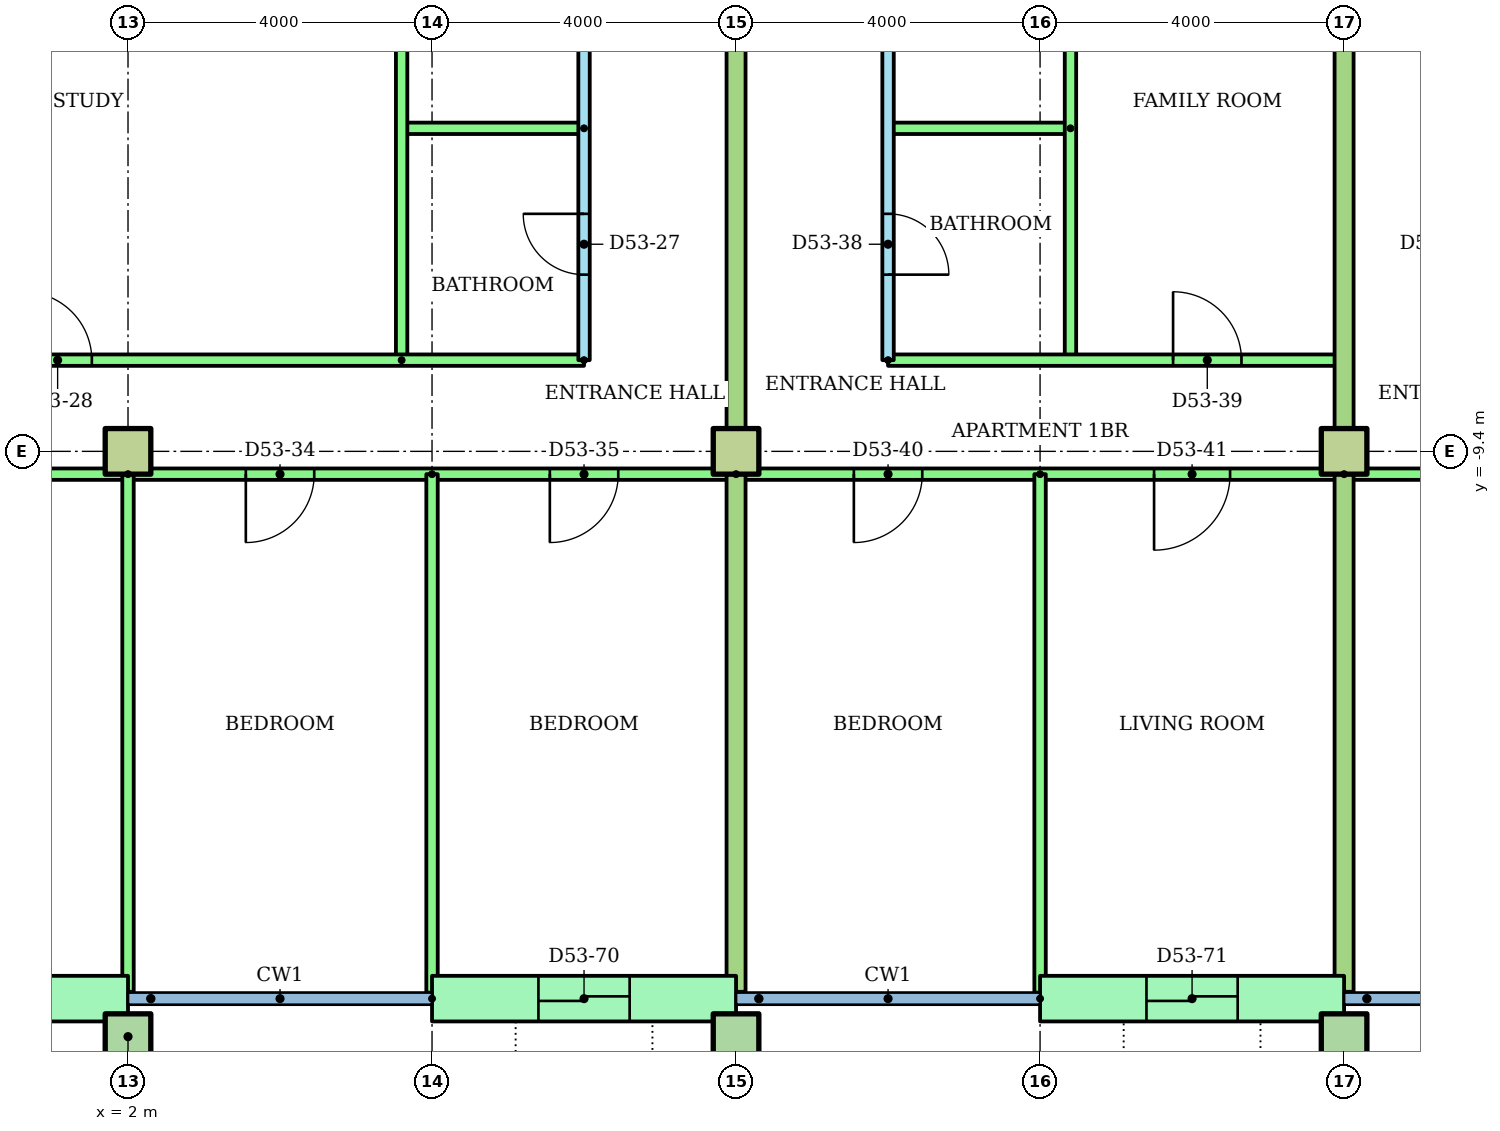
"""IFC4 building model, lengths in metres.
Left out: names, types, materials, properties, quantities, classifications, styles, units other than length and angle.
Written with IfcOpenShell. Run it as: python <this file> out.ifc"""

import sys

from ifc_helpers import new_model, si_unit, direction, frame, frame_2d, origin, origin_2d, place, context, subcontext, project, spatial, rectangle, hollow_rectangle, extrude, element, fill, save


model = new_model("IFC4")
c1 = context("Model", 3, precision=1e-05, world=origin(), true_north=direction((0.0, 1.0)))
c2 = subcontext(c1, "Body", "Model", "MODEL_VIEW")
j1 = project(units=[si_unit("LENGTHUNIT", "METRE"), si_unit("PLANEANGLEUNIT", "RADIAN")], contexts=[c1])
p1 = place(None, origin())
s1 = spatial("IfcSite", under=j1, at=p1, CompositionType="ELEMENT")
p2 = place(p1, origin())
s2 = spatial("IfcBuilding", under=s1, at=p2, CompositionType="ELEMENT")
p3 = place(p2, frame((0.0, 0.0, 207.6)))
s3 = spatial("IfcBuildingStorey", under=s2, at=p3, CompositionType="ELEMENT", Elevation=207.6)
for number, where in (
    (1, (2.0, -17.1, 0.0)),
    (2, (10.0, -17.1, 0.0)),
    (3, (18.0, -17.1, 0.0)),
):
    element("IfcColumn", number, at=place(p3, frame(where)), inside=s3, PredefinedType="COLUMN", context=c2, shape_type="SweptSolid", body=[
        extrude(hollow_rectangle(XDim=0.6, YDim=0.6, WallThickness=0.03, at=origin_2d()), origin(), (0.0, 0.0, 1.0), 3.2),
    ])
for number, where in (
    (4, (2.0, -9.4, 0.0)),
    (5, (10.0, -9.4, 0.0)),
    (6, (18.0, -9.4, 0.0)),
):
    element("IfcColumn", number, at=place(p3, frame(where)), inside=s3, PredefinedType="COLUMN", context=c2, shape_type="SweptSolid", body=[
        extrude(rectangle(XDim=0.6, YDim=0.6, at=origin_2d()), origin(), (0.0, 0.0, 1.0), 3.2),
    ])
p4 = place(p3, frame((-2.0, -16.6, 0.0)))
e7 = element("IfcWall", 7, at=p4, inside=s3, PredefinedType="STANDARD", context=c2, shape_type="SweptSolid", body=[
    extrude(rectangle(XDim=4.0, YDim=0.6, at=frame_2d((2.0, 0.0))), origin(), (0.0, 0.0, 1.0), 2.92),
])
p5 = place(p4, frame((1.4, 0.0, 0.0)))
e8 = element("IfcOpeningElement", 8, at=p5, cuts=e7, PredefinedType="OPENING", context=c2, shape_type="SweptSolid", body=[
    extrude(rectangle(XDim=1.2, YDim=2.1, at=frame_2d((0.6, 1.05))), frame((0.0, 0.31, 0.0), z_axis=(0.0, -1.0, 0.0), x_axis=(1.0, 0.0, 0.0)), (0.0, 0.0, 1.0), 0.62),
])
p6 = place(p3, frame((6.0, -16.6, 0.0)))
e9 = element("IfcWall", 9, at=p6, inside=s3, PredefinedType="STANDARD", context=c2, shape_type="SweptSolid", body=[
    extrude(rectangle(XDim=4.0, YDim=0.6, at=frame_2d((2.0, 0.0))), origin(), (0.0, 0.0, 1.0), 2.92),
])
p7 = place(p6, frame((1.4, 0.0, 0.0)))
e10 = element("IfcOpeningElement", 10, at=p7, cuts=e9, PredefinedType="OPENING", context=c2, shape_type="SweptSolid", body=[
    extrude(rectangle(XDim=1.2, YDim=2.1, at=frame_2d((0.6, 1.05))), frame((0.0, 0.31, 0.0), z_axis=(0.0, -1.0, 0.0), x_axis=(1.0, 0.0, 0.0)), (0.0, 0.0, 1.0), 0.62),
])
p8 = place(p3, frame((14.0, -16.6, 0.0)))
e11 = element("IfcWall", 11, at=p8, inside=s3, PredefinedType="STANDARD", context=c2, shape_type="SweptSolid", body=[
    extrude(rectangle(XDim=4.0, YDim=0.6, at=frame_2d((2.0, 0.0))), origin(), (0.0, 0.0, 1.0), 2.92),
])
p9 = place(p8, frame((1.4, 0.0, 0.0)))
e12 = element("IfcOpeningElement", 12, at=p9, cuts=e11, PredefinedType="OPENING", context=c2, shape_type="SweptSolid", body=[
    extrude(rectangle(XDim=1.2, YDim=2.1, at=frame_2d((0.6, 1.05))), frame((0.0, 0.31, 0.0), z_axis=(0.0, -1.0, 0.0), x_axis=(1.0, 0.0, 0.0)), (0.0, 0.0, 1.0), 0.62),
])
p10 = place(p3, frame((8.0, -8.2, 0.0), z_axis=(0.0, 0.0, 1.0), x_axis=(0.0, 1.0, 0.0)))
e13 = element("IfcWall", 13, at=p10, inside=s3, PredefinedType="PARTITIONING", context=c2, shape_type="SweptSolid", body=[
    extrude(rectangle(XDim=6.8, YDim=0.15, at=frame_2d((3.4, 0.0))), origin(), (0.0, 0.0, 1.0), 2.4),
])
p11 = place(p10, frame((4.475, 0.0, 0.0)))
e14 = element("IfcOpeningElement", 14, at=p11, cuts=e13, PredefinedType="OPENING", context=c2, shape_type="SweptSolid", body=[
    extrude(rectangle(XDim=0.9, YDim=2.1, at=frame_2d((0.45, 1.05))), frame((0.0, 0.085, 0.0), z_axis=(0.0, -1.0, 0.0), x_axis=(1.0, 0.0, 0.0)), (0.0, 0.0, 1.0), 0.17),
])
p12 = place(p10, frame((1.125, 0.0, 0.0)))
e15 = element("IfcOpeningElement", 15, at=p12, cuts=e13, PredefinedType="OPENING", context=c2, shape_type="SweptSolid", body=[
    extrude(rectangle(XDim=0.8, YDim=2.1, at=frame_2d((0.4, 1.05))), frame((0.0, 0.085, 0.0), z_axis=(0.0, -1.0, 0.0), x_axis=(1.0, 0.0, 0.0)), (0.0, 0.0, 1.0), 0.17),
])
p13 = place(p3, frame((8.0, -5.15, 0.0), z_axis=(0.0, 0.0, 1.0), x_axis=(-1.0, 0.0, 0.0)))
e16 = element("IfcWall", 16, at=p13, inside=s3, PredefinedType="PARTITIONING", context=c2, shape_type="SweptSolid", body=[
    extrude(rectangle(XDim=2.4, YDim=0.15, at=frame_2d((1.2, 0.0))), origin(), (0.0, 0.0, 1.0), 2.4),
])
p14 = place(p3, frame((5.6, -8.2, 0.0), z_axis=(0.0, 0.0, 1.0), x_axis=(0.0, 1.0, 0.0)))
e17 = element("IfcWall", 17, at=p14, inside=s3, PredefinedType="PARTITIONING", context=c2, shape_type="SweptSolid", body=[
    extrude(rectangle(XDim=6.8, YDim=0.15, at=frame_2d((3.4, 0.0))), origin(), (0.0, 0.0, 1.0), 2.4),
])
p15 = place(p3, frame((-14.0, -8.2, 0.0)))
e18 = element("IfcWall", 18, at=p15, inside=s3, PredefinedType="PARTITIONING", context=c2, shape_type="SweptSolid", body=[
    extrude(rectangle(XDim=22.0, YDim=0.15, at=frame_2d((11.0, 0.0))), origin(), (0.0, 0.0, 1.0), 2.4),
])
p16 = place(p15, frame((14.624, 0.0, 0.0)))
e19 = element("IfcOpeningElement", 19, at=p16, cuts=e18, PredefinedType="OPENING", context=c2, shape_type="SweptSolid", body=[
    extrude(rectangle(XDim=0.9, YDim=2.1, at=frame_2d((0.45, 1.05))), frame((0.0, 0.085, 0.0), z_axis=(0.0, -1.0, 0.0), x_axis=(1.0, 0.0, 0.0)), (0.0, 0.0, 1.0), 0.17),
])
p17 = place(p15, frame((8.476, 0.0, 0.0)))
e20 = element("IfcOpeningElement", 20, at=p17, cuts=e18, PredefinedType="OPENING", context=c2, shape_type="SweptSolid", body=[
    extrude(rectangle(XDim=0.9, YDim=2.1, at=frame_2d((0.45, 1.05))), frame((0.0, 0.085, 0.0), z_axis=(0.0, -1.0, 0.0), x_axis=(1.0, 0.0, 0.0)), (0.0, 0.0, 1.0), 0.17),
])
p18 = place(p15, frame((1.975, 0.0, 0.0)))
e21 = element("IfcOpeningElement", 21, at=p18, cuts=e18, PredefinedType="OPENING", context=c2, shape_type="SweptSolid", body=[
    extrude(rectangle(XDim=0.9, YDim=2.1, at=frame_2d((0.45, 1.05))), frame((0.0, 0.085, 0.0), z_axis=(0.0, -1.0, 0.0), x_axis=(1.0, 0.0, 0.0)), (0.0, 0.0, 1.0), 0.17),
])
p19 = place(p3, frame((10.0, -9.7, 0.0), z_axis=(0.0, 0.0, 1.0), x_axis=(-1.0, 0.0, 0.0)))
e22 = element("IfcWall", 22, at=p19, inside=s3, PredefinedType="PARTITIONING", context=c2, shape_type="SweptSolid", body=[
    extrude(rectangle(XDim=24.0, YDim=0.15, at=frame_2d((12.0, 0.0))), origin(), (0.0, 0.0, 1.0), 2.4),
])
p20 = place(p19, frame((21.55, 0.0, 0.0)))
e23 = element("IfcOpeningElement", 23, at=p20, cuts=e22, PredefinedType="OPENING", context=c2, shape_type="SweptSolid", body=[
    extrude(rectangle(XDim=0.9, YDim=2.1, at=frame_2d((0.45, 1.05))), frame((0.0, 0.085, 0.0), z_axis=(0.0, -1.0, 0.0), x_axis=(1.0, 0.0, 0.0)), (0.0, 0.0, 1.0), 0.17),
])
p21 = place(p19, frame((17.55, 0.0, 0.0)))
e24 = element("IfcOpeningElement", 24, at=p21, cuts=e22, PredefinedType="OPENING", context=c2, shape_type="SweptSolid", body=[
    extrude(rectangle(XDim=0.9, YDim=2.1, at=frame_2d((0.45, 1.05))), frame((0.0, 0.085, 0.0), z_axis=(0.0, -1.0, 0.0), x_axis=(1.0, 0.0, 0.0)), (0.0, 0.0, 1.0), 0.17),
])
p22 = place(p19, frame((11.5, 0.0, 0.0)))
e25 = element("IfcOpeningElement", 25, at=p22, cuts=e22, PredefinedType="OPENING", context=c2, shape_type="SweptSolid", body=[
    extrude(rectangle(XDim=1.0, YDim=2.1, at=frame_2d((0.5, 1.05))), frame((0.0, 0.085, 0.0), z_axis=(0.0, -1.0, 0.0), x_axis=(1.0, 0.0, 0.0)), (0.0, 0.0, 1.0), 0.17),
])
p23 = place(p19, frame((5.55, 0.0, 0.0)))
e26 = element("IfcOpeningElement", 26, at=p23, cuts=e22, PredefinedType="OPENING", context=c2, shape_type="SweptSolid", body=[
    extrude(rectangle(XDim=0.9, YDim=2.1, at=frame_2d((0.45, 1.05))), frame((0.0, 0.085, 0.0), z_axis=(0.0, -1.0, 0.0), x_axis=(1.0, 0.0, 0.0)), (0.0, 0.0, 1.0), 0.17),
])
p24 = place(p19, frame((1.55, 0.0, 0.0)))
e27 = element("IfcOpeningElement", 27, at=p24, cuts=e22, PredefinedType="OPENING", context=c2, shape_type="SweptSolid", body=[
    extrude(rectangle(XDim=0.9, YDim=2.1, at=frame_2d((0.45, 1.05))), frame((0.0, 0.085, 0.0), z_axis=(0.0, -1.0, 0.0), x_axis=(1.0, 0.0, 0.0)), (0.0, 0.0, 1.0), 0.17),
])
p25 = place(p3, frame((2.0, -9.7, 0.0), z_axis=(0.0, 0.0, 1.0), x_axis=(0.0, -1.0, 0.0)))
e28 = element("IfcWall", 28, at=p25, inside=s3, PredefinedType="PARTITIONING", context=c2, shape_type="SweptSolid", body=[
    extrude(rectangle(XDim=6.81, YDim=0.15, at=frame_2d((3.405, 0.0))), origin(), (0.0, 0.0, 1.0), 2.4),
])
p26 = place(p3, frame((6.0, -9.7, 0.0), z_axis=(0.0, 0.0, 1.0), x_axis=(0.0, -1.0, 0.0)))
e29 = element("IfcWall", 29, at=p26, inside=s3, PredefinedType="PARTITIONING", context=c2, shape_type="SweptSolid", body=[
    extrude(rectangle(XDim=6.821, YDim=0.15, at=frame_2d((3.411, 0.0))), origin(), (0.0, 0.0, 1.0), 2.4),
])
p27 = place(p3, frame((12.0, -1.4, 0.0), z_axis=(0.0, 0.0, 1.0), x_axis=(0.0, -1.0, 0.0)))
e30 = element("IfcWall", 30, at=p27, inside=s3, PredefinedType="PARTITIONING", context=c2, shape_type="SweptSolid", body=[
    extrude(rectangle(XDim=6.8, YDim=0.15, at=frame_2d((3.4, 0.0))), origin(), (0.0, 0.0, 1.0), 2.4),
])
p28 = place(p27, frame((1.425, 0.0, 0.0)))
e31 = element("IfcOpeningElement", 31, at=p28, cuts=e30, PredefinedType="OPENING", context=c2, shape_type="SweptSolid", body=[
    extrude(rectangle(XDim=0.9, YDim=2.1, at=frame_2d((0.45, 1.05))), frame((0.0, 0.085, 0.0), z_axis=(0.0, -1.0, 0.0), x_axis=(1.0, 0.0, 0.0)), (0.0, 0.0, 1.0), 0.17),
])
p29 = place(p27, frame((4.875, 0.0, 0.0)))
e32 = element("IfcOpeningElement", 32, at=p29, cuts=e30, PredefinedType="OPENING", context=c2, shape_type="SweptSolid", body=[
    extrude(rectangle(XDim=0.8, YDim=2.1, at=frame_2d((0.4, 1.05))), frame((0.0, 0.085, 0.0), z_axis=(0.0, -1.0, 0.0), x_axis=(1.0, 0.0, 0.0)), (0.0, 0.0, 1.0), 0.17),
])
p30 = place(p3, frame((14.4, -5.15, 0.0), z_axis=(0.0, 0.0, 1.0), x_axis=(-1.0, 0.0, 0.0)))
e33 = element("IfcWall", 33, at=p30, inside=s3, PredefinedType="PARTITIONING", context=c2, shape_type="SweptSolid", body=[
    extrude(rectangle(XDim=2.4, YDim=0.15, at=frame_2d((1.2, 0.0))), origin(), (0.0, 0.0, 1.0), 2.4),
])
p31 = place(p3, frame((14.4, -1.4, 0.0), z_axis=(0.0, 0.0, 1.0), x_axis=(0.0, -1.0, 0.0)))
e34 = element("IfcWall", 34, at=p31, inside=s3, PredefinedType="PARTITIONING", context=c2, shape_type="SweptSolid", body=[
    extrude(rectangle(XDim=6.8, YDim=0.15, at=frame_2d((3.4, 0.0))), origin(), (0.0, 0.0, 1.0), 2.4),
])
p32 = place(p3, frame((12.0, -8.2, 0.0)))
e35 = element("IfcWall", 35, at=p32, inside=s3, PredefinedType="PARTITIONING", context=c2, shape_type="SweptSolid", body=[
    extrude(rectangle(XDim=6.0, YDim=0.15, at=frame_2d((3.0, 0.0))), origin(), (0.0, 0.0, 1.0), 2.4),
])
p33 = place(p32, frame((3.75, 0.0, 0.0)))
e36 = element("IfcOpeningElement", 36, at=p33, cuts=e35, PredefinedType="OPENING", context=c2, shape_type="SweptSolid", body=[
    extrude(rectangle(XDim=0.9, YDim=2.1, at=frame_2d((0.45, 1.05))), frame((0.0, 0.085, 0.0), z_axis=(0.0, -1.0, 0.0), x_axis=(1.0, 0.0, 0.0)), (0.0, 0.0, 1.0), 0.17),
])
p34 = place(p3, frame((18.0, -9.7, 0.0), z_axis=(0.0, 0.0, 1.0), x_axis=(-1.0, 0.0, 0.0)))
e37 = element("IfcWall", 37, at=p34, inside=s3, PredefinedType="PARTITIONING", context=c2, shape_type="SweptSolid", body=[
    extrude(rectangle(XDim=8.0, YDim=0.15, at=frame_2d((4.0, 0.0))), origin(), (0.0, 0.0, 1.0), 2.4),
])
p35 = place(p34, frame((5.55, 0.0, 0.0)))
e38 = element("IfcOpeningElement", 38, at=p35, cuts=e37, PredefinedType="OPENING", context=c2, shape_type="SweptSolid", body=[
    extrude(rectangle(XDim=0.9, YDim=2.1, at=frame_2d((0.45, 1.05))), frame((0.0, 0.085, 0.0), z_axis=(0.0, -1.0, 0.0), x_axis=(1.0, 0.0, 0.0)), (0.0, 0.0, 1.0), 0.17),
])
p36 = place(p34, frame((1.5, 0.0, 0.0)))
e39 = element("IfcOpeningElement", 39, at=p36, cuts=e37, PredefinedType="OPENING", context=c2, shape_type="SweptSolid", body=[
    extrude(rectangle(XDim=1.0, YDim=2.1, at=frame_2d((0.5, 1.05))), frame((0.0, 0.085, 0.0), z_axis=(0.0, -1.0, 0.0), x_axis=(1.0, 0.0, 0.0)), (0.0, 0.0, 1.0), 0.17),
])
p37 = place(p3, frame((14.0, -9.7, 0.0), z_axis=(0.0, 0.0, 1.0), x_axis=(0.0, -1.0, 0.0)))
e40 = element("IfcWall", 40, at=p37, inside=s3, PredefinedType="PARTITIONING", context=c2, shape_type="SweptSolid", body=[
    extrude(rectangle(XDim=6.821, YDim=0.15, at=frame_2d((3.411, 0.0))), origin(), (0.0, 0.0, 1.0), 2.4),
])
p38 = place(p3, frame((10.0, -1.4, 0.0), z_axis=(0.0, 0.0, 1.0), x_axis=(0.0, -1.0, 0.0)))
e41 = element("IfcWall", 41, at=p38, inside=s3, PredefinedType="PARTITIONING", context=c2, shape_type="SweptSolid", body=[
    extrude(rectangle(XDim=15.11, YDim=0.25, at=frame_2d((7.555, 0.0))), origin(), (0.0, 0.0, 1.0), 2.4),
])
p39 = place(p3, frame((28.92, -9.7, 0.0), z_axis=(0.0, 0.0, 1.0), x_axis=(-1.0, 0.0, 0.0)))
e42 = element("IfcWall", 42, at=p39, inside=s3, PredefinedType="PARTITIONING", context=c2, shape_type="SweptSolid", body=[
    extrude(rectangle(XDim=10.92, YDim=0.15, at=frame_2d((5.46, 0.0))), origin(), (0.0, 0.0, 1.0), 2.4),
])
p40 = place(p39, frame((7.32, 0.0, 0.0)))
e43 = element("IfcOpeningElement", 43, at=p40, cuts=e42, PredefinedType="OPENING", context=c2, shape_type="SweptSolid", body=[
    extrude(rectangle(XDim=1.0, YDim=2.1, at=frame_2d((0.5, 1.05))), frame((0.0, 0.085, 0.0), z_axis=(0.0, -1.0, 0.0), x_axis=(1.0, 0.0, 0.0)), (0.0, 0.0, 1.0), 0.17),
])
p41 = place(p39, frame((1.544, 0.0, 0.0)))
e44 = element("IfcOpeningElement", 44, at=p41, cuts=e42, PredefinedType="OPENING", context=c2, shape_type="SweptSolid", body=[
    extrude(rectangle(XDim=0.9, YDim=2.1, at=frame_2d((0.45, 1.05))), frame((0.0, 0.085, 0.0), z_axis=(0.0, -1.0, 0.0), x_axis=(1.0, 0.0, 0.0)), (0.0, 0.0, 1.0), 0.17),
])
p42 = place(p3, frame((18.0, -1.4, 0.0), z_axis=(0.0, 0.0, 1.0), x_axis=(0.0, -1.0, 0.0)))
e45 = element("IfcWall", 45, at=p42, inside=s3, PredefinedType="PARTITIONING", context=c2, shape_type="SweptSolid", body=[
    extrude(rectangle(XDim=15.11, YDim=0.25, at=frame_2d((7.555, 0.0))), origin(), (0.0, 0.0, 1.0), 2.4),
])
p43 = place(p12, origin())
e46 = element("IfcDoor", 46, at=p43, inside=s3, OperationType="SINGLE_SWING_RIGHT", PredefinedType="DOOR", context=c2, shape_type="SweptSolid", body=[
    extrude(rectangle(XDim=0.8, YDim=2.1, at=frame_2d((0.4, 1.05))), frame((0.0, 0.025, 0.0), z_axis=(0.0, -1.0, 0.0), x_axis=(1.0, 0.0, 0.0)), (0.0, 0.0, 1.0), 0.05),
])
fill(e15, e46)
p44 = place(p16, origin())
e47 = element("IfcDoor", 47, at=p44, inside=s3, OperationType="SINGLE_SWING_LEFT", PredefinedType="DOOR", context=c2, shape_type="SweptSolid", body=[
    extrude(rectangle(XDim=0.9, YDim=2.1, at=frame_2d((0.45, 1.05))), frame((0.0, 0.025, 0.0), z_axis=(0.0, -1.0, 0.0), x_axis=(1.0, 0.0, 0.0)), (0.0, 0.0, 1.0), 0.05),
])
fill(e19, e47)
p45 = place(p23, origin())
e48 = element("IfcDoor", 48, at=p45, inside=s3, OperationType="SINGLE_SWING_RIGHT", PredefinedType="DOOR", context=c2, shape_type="SweptSolid", body=[
    extrude(rectangle(XDim=0.9, YDim=2.1, at=frame_2d((0.45, 1.05))), frame((0.0, 0.025, 0.0), z_axis=(0.0, -1.0, 0.0), x_axis=(1.0, 0.0, 0.0)), (0.0, 0.0, 1.0), 0.05),
])
fill(e26, e48)
p46 = place(p24, origin())
e49 = element("IfcDoor", 49, at=p46, inside=s3, OperationType="SINGLE_SWING_RIGHT", PredefinedType="DOOR", context=c2, shape_type="SweptSolid", body=[
    extrude(rectangle(XDim=0.9, YDim=2.1, at=frame_2d((0.45, 1.05))), frame((0.0, 0.025, 0.0), z_axis=(0.0, -1.0, 0.0), x_axis=(1.0, 0.0, 0.0)), (0.0, 0.0, 1.0), 0.05),
])
fill(e27, e49)
p47 = place(p29, origin())
e50 = element("IfcDoor", 50, at=p47, inside=s3, OperationType="SINGLE_SWING_RIGHT", PredefinedType="DOOR", context=c2, shape_type="SweptSolid", body=[
    extrude(rectangle(XDim=0.8, YDim=2.1, at=frame_2d((0.4, 1.05))), frame((0.0, 0.025, 0.0), z_axis=(0.0, -1.0, 0.0), x_axis=(1.0, 0.0, 0.0)), (0.0, 0.0, 1.0), 0.05),
])
fill(e32, e50)
p48 = place(p33, origin())
e51 = element("IfcDoor", 51, at=p48, inside=s3, OperationType="SINGLE_SWING_LEFT", PredefinedType="DOOR", context=c2, shape_type="SweptSolid", body=[
    extrude(rectangle(XDim=0.9, YDim=2.1, at=frame_2d((0.45, 1.05))), frame((0.0, 0.025, 0.0), z_axis=(0.0, -1.0, 0.0), x_axis=(1.0, 0.0, 0.0)), (0.0, 0.0, 1.0), 0.05),
])
fill(e36, e51)
p49 = place(p35, origin())
e52 = element("IfcDoor", 52, at=p49, inside=s3, OperationType="SINGLE_SWING_RIGHT", PredefinedType="DOOR", context=c2, shape_type="SweptSolid", body=[
    extrude(rectangle(XDim=0.9, YDim=2.1, at=frame_2d((0.45, 1.05))), frame((0.0, 0.025, 0.0), z_axis=(0.0, -1.0, 0.0), x_axis=(1.0, 0.0, 0.0)), (0.0, 0.0, 1.0), 0.05),
])
fill(e38, e52)
p50 = place(p36, origin())
e53 = element("IfcDoor", 53, at=p50, inside=s3, OperationType="SINGLE_SWING_RIGHT", PredefinedType="DOOR", context=c2, shape_type="SweptSolid", body=[
    extrude(rectangle(XDim=1.0, YDim=2.1, at=frame_2d((0.5, 1.05))), frame((0.0, 0.025, 0.0), z_axis=(0.0, -1.0, 0.0), x_axis=(1.0, 0.0, 0.0)), (0.0, 0.0, 1.0), 0.05),
])
fill(e39, e53)
p51 = place(p7, origin())
e54 = element("IfcDoor", 54, at=p51, inside=s3, OperationType="SLIDING_TO_LEFT", PredefinedType="DOOR", context=c2, shape_type="SweptSolid", body=[
    extrude(rectangle(XDim=1.2, YDim=2.1, at=frame_2d((0.6, 1.05))), frame((0.0, 0.025, 0.0), z_axis=(0.0, -1.0, 0.0), x_axis=(1.0, 0.0, 0.0)), (0.0, 0.0, 1.0), 0.05),
])
fill(e10, e54)
p52 = place(p9, origin())
e55 = element("IfcDoor", 55, at=p52, inside=s3, OperationType="SLIDING_TO_LEFT", PredefinedType="DOOR", context=c2, shape_type="SweptSolid", body=[
    extrude(rectangle(XDim=1.2, YDim=2.1, at=frame_2d((0.6, 1.05))), frame((0.0, 0.025, 0.0), z_axis=(0.0, -1.0, 0.0), x_axis=(1.0, 0.0, 0.0)), (0.0, 0.0, 1.0), 0.05),
])
fill(e12, e55)
save(model, sys.argv[1])
